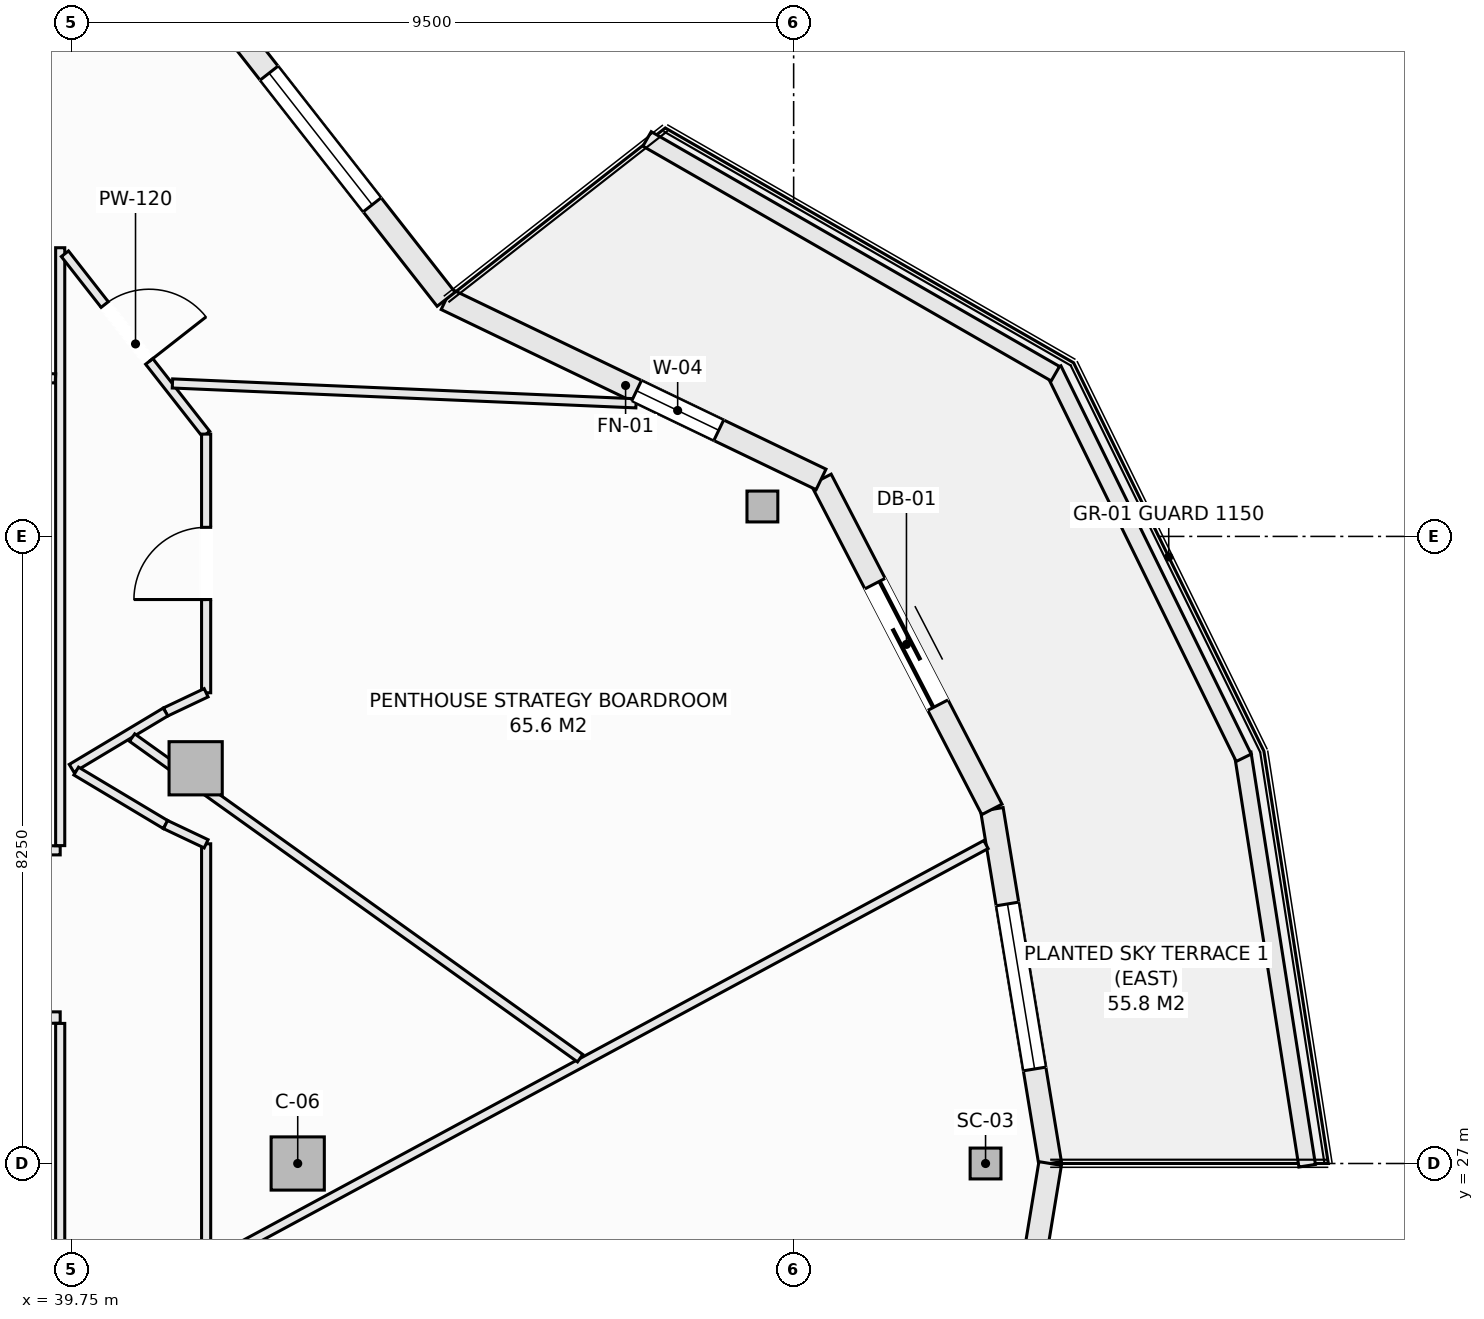
"""IFC4 building model, lengths in metres.
Left out: names, types, materials, properties, quantities, classifications, styles, units other than length and angle.
Written with IfcOpenShell. Run it as: python <this file> out.ifc"""

import sys

from ifc_helpers import new_model, si_unit, direction, frame, frame_2d, origin, origin_2d, place, context, subcontext, project, spatial, rectangle, hollow_rectangle, extrude, element, fill, save


model = new_model("IFC4")
c1 = context("Model", 3, precision=1e-05, world=origin(), true_north=direction((0.0, 1.0)))
c2 = subcontext(c1, "Body", "Model", "MODEL_VIEW")
j1 = project(units=[si_unit("LENGTHUNIT", "METRE"), si_unit("PLANEANGLEUNIT", "RADIAN")], contexts=[c1])
p1 = place(None, origin())
s1 = spatial("IfcSite", under=j1, at=p1, CompositionType="ELEMENT")
p2 = place(p1, origin())
s2 = spatial("IfcBuilding", under=s1, at=p2, CompositionType="ELEMENT")
p3 = place(p2, frame((0.0, 0.0, 249.2)))
s3 = spatial("IfcBuildingStorey", under=s2, at=p3, CompositionType="ELEMENT", Elevation=249.2)
for number, where, z_axis, x_axis in (
    (1, (51.775, 27.0, -0.27), (0.0, 0.0, 1.0), (1.0, 0.0, 0.0)),
    (2, (48.839, 35.644, -0.27), (0.0, 0.0, 1.0), (1.0, 0.0, 0.0)),
):
    element("IfcColumn", number, at=place(p3, frame(where, z_axis=z_axis, x_axis=x_axis)), inside=s3, PredefinedType="COLUMN", context=c2, shape_type="SweptSolid", body=[
        extrude(hollow_rectangle(XDim=0.406, YDim=0.406, WallThickness=0.016, at=origin_2d()), origin(), (0.0, 0.0, 1.0), 3.3),
    ])
for number, where, z_axis, x_axis in (
    (3, (42.725, 27.0, -0.27), (0.0, 0.0, 1.0), (1.0, 0.0, 0.0)),
    (4, (41.382, 32.199, -0.27), (0.0, 0.0, 1.0), (1.0, 0.0, 0.0)),
):
    element("IfcColumn", number, at=place(p3, frame(where, z_axis=z_axis, x_axis=x_axis)), inside=s3, PredefinedType="COLUMN", context=c2, shape_type="SweptSolid", body=[
        extrude(rectangle(XDim=0.7, YDim=0.7, at=origin_2d()), origin(), (0.0, 0.0, 1.0), 3.3),
    ])
p4 = place(p3, frame((51.858, 31.659, 0.0), z_axis=(0.0, 0.0, 1.0), x_axis=(0.162369371657, -0.986730047758, 0.0)))
e5 = element("IfcWall", 5, at=p4, inside=s3, PredefinedType="SOLIDWALL", context=c2, shape_type="SweptSolid", body=[
    extrude(rectangle(XDim=4.721, YDim=0.3, at=frame_2d((2.361, 0.0))), origin(), (0.0, 0.0, 1.0), 2.605),
])
p5 = place(p4, frame((1.261, 0.0, 0.72)))
e6 = element("IfcOpeningElement", 6, at=p5, cuts=e5, PredefinedType="OPENING", context=c2, shape_type="SweptSolid", body=[
    extrude(rectangle(XDim=2.2, YDim=1.65, at=frame_2d((1.1, 0.825))), frame((0.0, 0.16, 0.0), z_axis=(0.0, -1.0, 0.0), x_axis=(1.0, 0.0, 0.0)), (0.0, 0.0, 1.0), 0.32),
])
p6 = place(p3, frame((49.611, 36.0, 0.0), z_axis=(0.0, 0.0, 1.0), x_axis=(0.459793771602, -0.888025724625, 0.0)))
e7 = element("IfcWall", 7, at=p6, inside=s3, PredefinedType="SOLIDWALL", context=c2, shape_type="SweptSolid", body=[
    extrude(rectangle(XDim=4.889, YDim=0.3, at=frame_2d((2.444, 0.0))), origin(), (0.0, 0.0, 1.0), 2.605),
])
p7 = place(p6, frame((1.544, 0.0, 0.0)))
e8 = element("IfcOpeningElement", 8, at=p7, cuts=e7, PredefinedType="OPENING", context=c2, shape_type="SweptSolid", body=[
    extrude(rectangle(XDim=1.8, YDim=2.25, at=frame_2d((0.9, 1.125))), frame((0.0, 0.16, 0.0), z_axis=(0.0, -1.0, 0.0), x_axis=(1.0, 0.0, 0.0)), (0.0, 0.0, 1.0), 0.32),
])
p8 = place(p3, frame((44.677, 38.37, 0.0), z_axis=(0.0, 0.0, 1.0), x_axis=(0.901355238351, -0.433080517106, 0.0)))
e9 = element("IfcWall", 9, at=p8, inside=s3, PredefinedType="SOLIDWALL", context=c2, shape_type="SweptSolid", body=[
    extrude(rectangle(XDim=5.473, YDim=0.3, at=frame_2d((2.737, 0.0))), origin(), (0.0, 0.0, 1.0), 2.605),
])
p9 = place(p8, frame((2.78, 0.0, 0.72)))
e10 = element("IfcOpeningElement", 10, at=p9, cuts=e9, PredefinedType="OPENING", context=c2, shape_type="SweptSolid", body=[
    extrude(rectangle(XDim=1.2, YDim=1.65, at=frame_2d((0.6, 0.825))), frame((0.0, 0.16, 0.0), z_axis=(0.0, -1.0, 0.0), x_axis=(1.0, 0.0, 0.0)), (0.0, 0.0, 1.0), 0.32),
])
p10 = place(p3, frame((41.375, 42.588, 0.0), z_axis=(0.0, 0.0, 1.0), x_axis=(0.61644588519, -0.787397276241, 0.0)))
e11 = element("IfcWall", 11, at=p10, inside=s3, PredefinedType="SOLIDWALL", context=c2, shape_type="SweptSolid", body=[
    extrude(rectangle(XDim=5.357, YDim=0.3, at=frame_2d((2.678, 0.0))), origin(), (0.0, 0.0, 1.0), 2.605),
])
p11 = place(p10, frame((1.579, 0.0, 0.72)))
e12 = element("IfcOpeningElement", 12, at=p11, cuts=e11, PredefinedType="OPENING", context=c2, shape_type="SweptSolid", body=[
    extrude(rectangle(XDim=2.2, YDim=1.65, at=frame_2d((1.1, 0.825))), frame((0.0, 0.16, 0.0), z_axis=(0.0, -1.0, 0.0), x_axis=(1.0, 0.0, 0.0)), (0.0, 0.0, 1.0), 0.32),
])
p12 = place(p3, frame((51.858, 22.341, 0.0), z_axis=(0.0, 0.0, 1.0), x_axis=(0.162369371657, 0.986730047758, 0.0)))
e13 = element("IfcWall", 13, at=p12, inside=s3, PredefinedType="SOLIDWALL", context=c2, shape_type="SweptSolid", body=[
    extrude(rectangle(XDim=4.721, YDim=0.3, at=frame_2d((2.361, 0.0))), origin(), (0.0, 0.0, 1.0), 2.605),
])
p13 = place(p12, frame((1.261, 0.0, 0.72)))
e14 = element("IfcOpeningElement", 14, at=p13, cuts=e13, PredefinedType="OPENING", context=c2, shape_type="SweptSolid", body=[
    extrude(rectangle(XDim=2.2, YDim=1.65, at=frame_2d((1.1, 0.825))), frame((0.0, 0.16, 0.0), z_axis=(0.0, -1.0, 0.0), x_axis=(1.0, 0.0, 0.0)), (0.0, 0.0, 1.0), 0.32),
])
p14 = place(p3, frame((55.158, 32.396, 0.0), z_axis=(0.0, 0.0, 1.0), x_axis=(0.154441975483, -0.988001860428, 0.0)))
e15 = element("IfcWall", 15, at=p14, inside=s3, PredefinedType="PARAPET", context=c2, shape_type="SweptSolid", body=[
    extrude(rectangle(XDim=5.492, YDim=0.22, at=frame_2d((2.746, 0.0))), origin(), (0.0, 0.0, 1.0), 0.52),
])
p15 = place(p3, frame((52.667, 37.447, 0.0), z_axis=(0.0, 0.0, 1.0), x_axis=(0.440058847499, -0.897968936399, 0.0)))
e16 = element("IfcWall", 16, at=p15, inside=s3, PredefinedType="PARAPET", context=c2, shape_type="SweptSolid", body=[
    extrude(rectangle(XDim=5.689, YDim=0.22, at=frame_2d((2.845, 0.0))), origin(), (0.0, 0.0, 1.0), 0.52),
])
p16 = place(p3, frame((47.321, 40.479, 0.0), z_axis=(0.0, 0.0, 1.0), x_axis=(0.866901621005, -0.49847926687, 0.0)))
e17 = element("IfcWall", 17, at=p16, inside=s3, PredefinedType="PARAPET", context=c2, shape_type="SweptSolid", body=[
    extrude(rectangle(XDim=6.197, YDim=0.22, at=frame_2d((3.098, 0.0))), origin(), (0.0, 0.0, 1.0), 0.52),
])
p17 = place(p3, frame((30.077, 28.92, 0.0), z_axis=(0.0, 0.0, 1.0), x_axis=(1.0, 0.0, 0.0)))
e18 = element("IfcWall", 18, at=p17, inside=s3, PredefinedType="PARTITIONING", context=c2, shape_type="SweptSolid", body=[
    extrude(rectangle(XDim=9.523, YDim=0.15, at=frame_2d((4.762, 0.0))), origin(), (0.0, 0.0, 1.0), 3.03),
])
p18 = place(p3, frame((38.862, 31.12, 0.0), z_axis=(0.0, 0.0, 1.0), x_axis=(1.0, 0.0, 0.0)))
e19 = element("IfcWall", 19, at=p18, inside=s3, PredefinedType="PARTITIONING", context=c2, shape_type="SweptSolid", body=[
    extrude(rectangle(XDim=0.738, YDim=0.12, at=frame_2d((0.369, 0.0))), origin(), (0.0, 0.0, 1.0), 3.03),
])
p19 = place(p3, frame((39.6, 25.197, 0.0), z_axis=(0.0, 0.0, 1.0), x_axis=(0.0, 1.0, 0.0)))
e20 = element("IfcWall", 20, at=p19, inside=s3, PredefinedType="PARTITIONING", context=c2, shape_type="SweptSolid", body=[
    extrude(rectangle(XDim=3.646, YDim=0.12, at=frame_2d((1.823, 0.0))), origin(), (0.0, 0.0, 1.0), 3.03),
])
p20 = place(p3, frame((39.6, 31.182, 0.0), z_axis=(0.0, 0.0, 1.0), x_axis=(0.0, 1.0, 0.0)))
e21 = element("IfcWall", 21, at=p20, inside=s3, PredefinedType="PARTITIONING", context=c2, shape_type="SweptSolid", body=[
    extrude(rectangle(XDim=7.866, YDim=0.12, at=frame_2d((3.933, 0.0))), origin(), (0.0, 0.0, 1.0), 3.03),
])
p21 = place(p3, frame((39.662, 38.969, 0.0), z_axis=(0.0, 0.0, 1.0), x_axis=(0.616500468458, -0.787354540465, 0.0)))
e22 = element("IfcWall", 22, at=p21, inside=s3, PredefinedType="PARTITIONING", context=c2, shape_type="SweptSolid", body=[
    extrude(rectangle(XDim=3.014, YDim=0.12, at=frame_2d((1.507, 0.0))), origin(), (0.0, 0.0, 1.0), 3.03),
])
p22 = place(p21, frame((0.849, 0.0, 0.0)))
e23 = element("IfcOpeningElement", 23, at=p22, cuts=e22, PredefinedType="OPENING", context=c2, shape_type="SweptSolid", body=[
    extrude(rectangle(XDim=0.95, YDim=2.1, at=frame_2d((0.475, 1.05))), frame((0.0, 0.07, 0.0), z_axis=(0.0, -1.0, 0.0), x_axis=(1.0, 0.0, 0.0)), (0.0, 0.0, 1.0), 0.14),
])
p23 = place(p3, frame((41.52, 22.794, 0.0), z_axis=(0.0, 0.0, 1.0), x_axis=(0.0, 1.0, 0.0)))
e24 = element("IfcWall", 24, at=p23, inside=s3, PredefinedType="PARTITIONING", context=c2, shape_type="SweptSolid", body=[
    extrude(rectangle(XDim=8.412, YDim=0.12, at=frame_2d((4.206, 0.0))), origin(), (0.0, 0.0, 1.0), 2.478),
])
p24 = place(p3, frame((41.52, 33.193, 0.0), z_axis=(0.0, 0.0, 1.0), x_axis=(0.0, 1.0, 0.0)))
e25 = element("IfcWall", 25, at=p24, inside=s3, PredefinedType="PARTITIONING", context=c2, shape_type="SweptSolid", body=[
    extrude(rectangle(XDim=3.403, YDim=0.12, at=frame_2d((1.701, 0.0))), origin(), (0.0, 0.0, 1.0), 3.03),
])
p25 = place(p24, frame((1.227, 0.0, 0.0)))
e26 = element("IfcOpeningElement", 26, at=p25, cuts=e25, PredefinedType="OPENING", context=c2, shape_type="SweptSolid", body=[
    extrude(rectangle(XDim=0.95, YDim=2.1, at=frame_2d((0.475, 1.05))), frame((0.0, 0.07, 0.0), z_axis=(0.0, -1.0, 0.0), x_axis=(1.0, 0.0, 0.0)), (0.0, 0.0, 1.0), 0.14),
])
p26 = place(p3, frame((40.986, 32.94, 0.0), z_axis=(0.0, 0.0, 1.0), x_axis=(0.90356951601, 0.428441512621, 0.0)))
e27 = element("IfcWall", 27, at=p26, inside=s3, PredefinedType="PARTITIONING", context=c2, shape_type="SweptSolid", body=[
    extrude(rectangle(XDim=0.591, YDim=0.12, at=frame_2d((0.295, 0.0))), origin(), (0.0, 0.0, 1.0), 3.03),
])
p27 = place(p3, frame((39.75, 32.199, 0.0), z_axis=(0.0, 0.0, 1.0), x_axis=(0.857702120906, 0.514146935996, 0.0)))
e28 = element("IfcWall", 28, at=p27, inside=s3, PredefinedType="PARTITIONING", context=c2, shape_type="SweptSolid", body=[
    extrude(rectangle(XDim=1.441, YDim=0.12, at=frame_2d((0.721, 0.0))), origin(), (0.0, 0.0, 1.0), 3.03),
])
p28 = place(p3, frame((39.81, 32.163, 0.0), z_axis=(0.0, 0.0, 1.0), x_axis=(0.858011245414, -0.513630901273, 0.0)))
e29 = element("IfcWall", 29, at=p28, inside=s3, PredefinedType="PARTITIONING", context=c2, shape_type="SweptSolid", body=[
    extrude(rectangle(XDim=1.37, YDim=0.12, at=frame_2d((0.685, 0.0))), origin(), (0.0, 0.0, 1.0), 3.03),
])
p29 = place(p3, frame((40.986, 31.459, 0.0), z_axis=(0.0, 0.0, 1.0), x_axis=(0.903729424576, -0.428104107847, 0.0)))
e30 = element("IfcWall", 30, at=p29, inside=s3, PredefinedType="PARTITIONING", context=c2, shape_type="SweptSolid", body=[
    extrude(rectangle(XDim=0.591, YDim=0.12, at=frame_2d((0.295, 0.0))), origin(), (0.0, 0.0, 1.0), 3.03),
])
p30 = place(p3, frame((41.582, 25.693, 0.0), z_axis=(0.0, 0.0, 1.0), x_axis=(0.880032375067, 0.474913696195, 0.0)))
e31 = element("IfcWall", 31, at=p30, inside=s3, PredefinedType="PARTITIONING", context=c2, shape_type="SweptSolid", body=[
    extrude(rectangle(XDim=11.589, YDim=0.12, at=frame_2d((5.794, 0.0))), origin(), (0.0, 0.0, 1.0), 2.478),
])
p31 = place(p3, frame((40.546, 32.604, 0.0), z_axis=(0.0, 0.0, 1.0), x_axis=(0.813264440548, -0.581894277116, 0.0)))
e32 = element("IfcWall", 32, at=p31, inside=s3, PredefinedType="PARTITIONING", context=c2, shape_type="SweptSolid", body=[
    extrude(rectangle(XDim=7.249, YDim=0.12, at=frame_2d((3.625, 0.0))), origin(), (0.0, 0.0, 1.0), 3.03),
])
p32 = place(p3, frame((33.699, 37.579, 0.0), z_axis=(0.0, 0.0, 1.0), x_axis=(0.999081056781, -0.042860727724, 0.0)))
e33 = element("IfcWall", 33, at=p32, inside=s3, PredefinedType="PARTITIONING", context=c2, shape_type="SweptSolid", body=[
    extrude(rectangle(XDim=5.844, YDim=0.12, at=frame_2d((2.922, 0.0))), origin(), (0.0, 0.0, 1.0), 2.478),
])
p33 = place(p3, frame((41.077, 37.262, 0.0), z_axis=(0.0, 0.0, 1.0), x_axis=(0.999080744008, -0.042868017834, 0.0)))
e34 = element("IfcWall", 34, at=p33, inside=s3, PredefinedType="PARTITIONING", context=c2, shape_type="SweptSolid", body=[
    extrude(rectangle(XDim=6.105, YDim=0.12, at=frame_2d((3.053, 0.0))), origin(), (0.0, 0.0, 1.0), 2.605),
])
p34 = place(p5, origin())
e35 = element("IfcWindow", 35, at=p34, inside=s3, PartitioningType="SINGLE_PANEL", PredefinedType="WINDOW", context=c2, shape_type="SweptSolid", body=[
    extrude(rectangle(XDim=2.2, YDim=1.65, at=frame_2d((1.1, 0.825))), frame((0.0, 0.03, 0.0), z_axis=(0.0, -1.0, 0.0), x_axis=(1.0, 0.0, 0.0)), (0.0, 0.0, 1.0), 0.06),
])
fill(e6, e35)
p35 = place(p7, origin())
e36 = element("IfcDoor", 36, at=p35, inside=s3, OperationType="SLIDING_TO_LEFT", PredefinedType="DOOR", context=c2, shape_type="SweptSolid", body=[
    extrude(rectangle(XDim=1.8, YDim=2.25, at=frame_2d((0.9, 1.125))), frame((0.0, 0.025, 0.0), z_axis=(0.0, -1.0, 0.0), x_axis=(1.0, 0.0, 0.0)), (0.0, 0.0, 1.0), 0.05),
])
fill(e8, e36)
p36 = place(p9, origin())
e37 = element("IfcWindow", 37, at=p36, inside=s3, PartitioningType="SINGLE_PANEL", PredefinedType="WINDOW", context=c2, shape_type="SweptSolid", body=[
    extrude(rectangle(XDim=1.2, YDim=1.65, at=frame_2d((0.6, 0.825))), frame((0.0, 0.03, 0.0), z_axis=(0.0, -1.0, 0.0), x_axis=(1.0, 0.0, 0.0)), (0.0, 0.0, 1.0), 0.06),
])
fill(e10, e37)
p37 = place(p11, origin())
e38 = element("IfcWindow", 38, at=p37, inside=s3, PartitioningType="SINGLE_PANEL", PredefinedType="WINDOW", context=c2, shape_type="SweptSolid", body=[
    extrude(rectangle(XDim=2.2, YDim=1.65, at=frame_2d((1.1, 0.825))), frame((0.0, 0.03, 0.0), z_axis=(0.0, -1.0, 0.0), x_axis=(1.0, 0.0, 0.0)), (0.0, 0.0, 1.0), 0.06),
])
fill(e12, e38)
p38 = place(p25, origin())
e39 = element("IfcDoor", 39, at=p38, inside=s3, OperationType="SINGLE_SWING_LEFT", PredefinedType="DOOR", context=c2, shape_type="SweptSolid", body=[
    extrude(rectangle(XDim=0.95, YDim=2.1, at=frame_2d((0.475, 1.05))), frame((0.0, 0.025, 0.0), z_axis=(0.0, -1.0, 0.0), x_axis=(1.0, 0.0, 0.0)), (0.0, 0.0, 1.0), 0.05),
])
fill(e26, e39)
p39 = place(p22, origin())
e40 = element("IfcDoor", 40, at=p39, inside=s3, OperationType="SINGLE_SWING_RIGHT", PredefinedType="DOOR", context=c2, shape_type="SweptSolid", body=[
    extrude(rectangle(XDim=0.95, YDim=2.1, at=frame_2d((0.475, 1.05))), frame((0.0, 0.025, 0.0), z_axis=(0.0, -1.0, 0.0), x_axis=(1.0, 0.0, 0.0)), (0.0, 0.0, 1.0), 0.05),
])
fill(e23, e40)
save(model, sys.argv[1])
